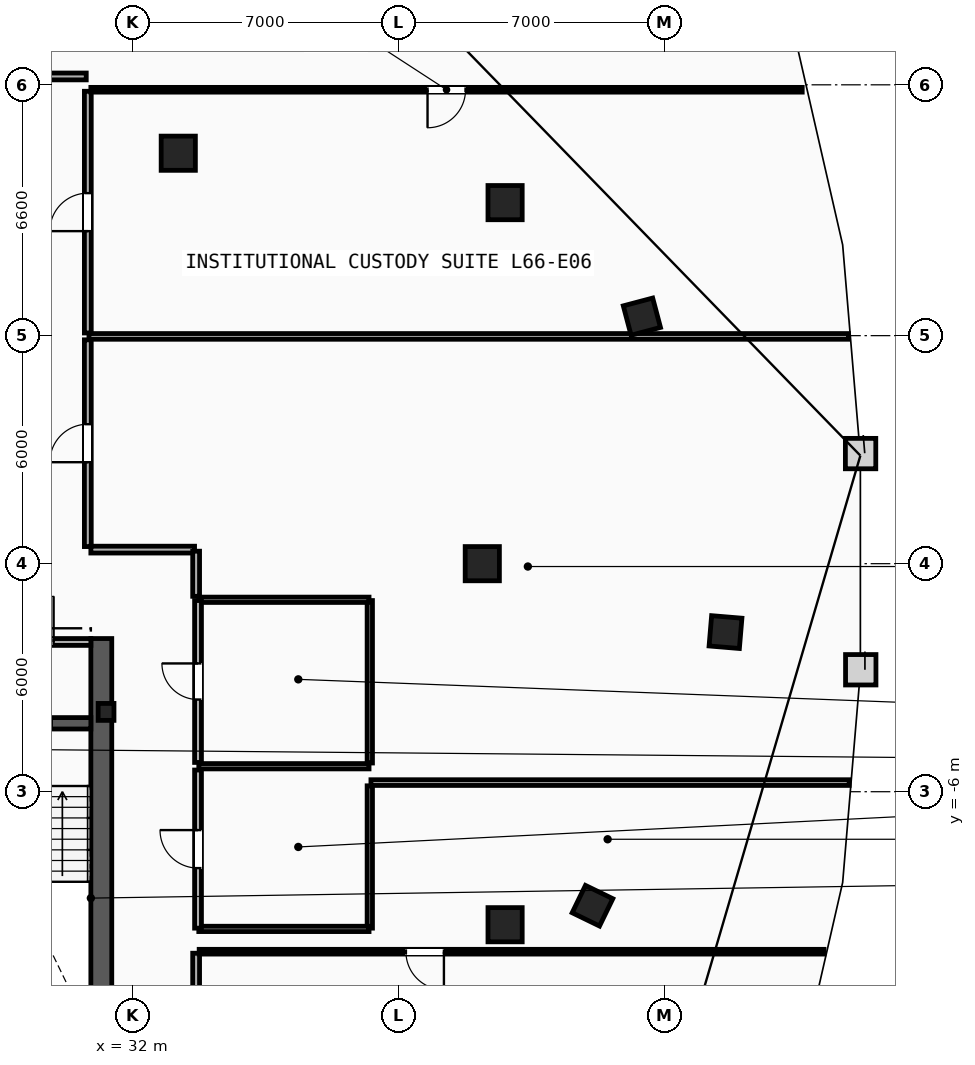
"""IFC4 building model, lengths in metres.
Left out: names, types, materials, properties, quantities, classifications, styles, units other than length and angle.
Written with IfcOpenShell. Run it as: python <this file> out.ifc"""

import sys

from ifc_helpers import new_model, si_unit, direction, frame, frame_2d, origin, origin_2d, place, context, subcontext, project, spatial, rectangle, i_section, extrude, element, fill, save


model = new_model("IFC4")
c1 = context("Model", 3, precision=1e-05, world=origin(), true_north=direction((0.0, 1.0)))
c2 = subcontext(c1, "Body", "Model", "MODEL_VIEW")
j1 = project(units=[si_unit("LENGTHUNIT", "METRE"), si_unit("PLANEANGLEUNIT", "RADIAN")], contexts=[c1])
p1 = place(None, origin())
s1 = spatial("IfcSite", under=j1, at=p1, CompositionType="ELEMENT")
p2 = place(p1, origin())
s2 = spatial("IfcBuilding", under=s1, at=p2, CompositionType="ELEMENT")
p3 = place(p2, frame((0.0, 0.0, 250.4)))
s3 = spatial("IfcBuildingStorey", under=s2, at=p3, CompositionType="ELEMENT", Elevation=250.4)
p4 = place(p3, frame((31.3, -3.9, 0.0), z_axis=(0.0, 0.0, 1.0), x_axis=(1.0, 0.0, 0.0)))
e1 = element("IfcColumn", 1, at=p4, inside=s3, PredefinedType="COLUMN", context=c2, shape_type="SweptSolid", body=[
    extrude(i_section(OverallWidth=0.416, OverallDepth=0.446, WebThickness=0.039, FlangeThickness=0.063, FilletRadius=0.018, at=origin_2d()), origin(), (0.0, 0.0, 1.0), 3.6),
])
for number, where, z_axis, x_axis in (
    (2, (41.2, 0.0, 0.0), (0.0, 0.0, 1.0), (1.0, 0.0, 0.0)),
    (3, (41.8, -9.5, 0.0), (0.0, 0.0, 1.0), (1.0, 0.0, 0.0)),
    (4, (41.8, 9.5, 0.0), (0.0, 0.0, 1.0), (1.0, 0.0, 0.0)),
    (5, (33.2, 10.8, 0.0), (0.0, 0.0, 1.0), (1.0, 0.0, 0.0)),
):
    element("IfcColumn", number, at=place(p3, frame(where, z_axis=z_axis, x_axis=x_axis)), inside=s3, PredefinedType="COLUMN", context=c2, shape_type="SweptSolid", body=[
        extrude(rectangle(XDim=0.9, YDim=0.9, at=origin_2d()), origin(), (0.0, 0.0, 1.0), 3.6),
    ])
for number, where, z_axis, x_axis in (
    (6, (44.1, -9.0, 0.0), (0.0, 0.0, 1.0), (0.437, 0.899, 0.0)),
    (7, (47.6, -1.8, 0.0), (0.0, 0.0, 1.0), (0.084, 0.997, 0.0)),
    (8, (45.4, 6.5, 0.0), (0.0, 0.0, 1.0), (-0.256, 0.967, 0.0)),
):
    element("IfcColumn", number, at=place(p3, frame(where, z_axis=z_axis, x_axis=x_axis)), inside=s3, PredefinedType="COLUMN", context=c2, shape_type="SweptSolid", body=[
        extrude(rectangle(XDim=0.8, YDim=0.8, at=origin_2d()), origin(), (0.0, 0.0, 1.0), 3.6),
    ])
p5 = place(p3, frame((31.175, -15.3, 0.0), z_axis=(0.0, 0.0, 1.0), x_axis=(0.0, 1.0, 0.0)))
e9 = element("IfcWall", 9, at=p5, inside=s3, PredefinedType="SHEAR", context=c2, shape_type="SweptSolid", body=[
    extrude(rectangle(XDim=13.33, YDim=0.55, at=frame_2d((6.665, 0.0))), origin(), (0.0, 0.0, 1.0), 3.34),
])
p6 = place(p3, frame((27.74, -4.2, 0.0), z_axis=(0.0, 0.0, 1.0), x_axis=(1.0, 0.0, 0.0)))
e10 = element("IfcWall", 10, at=p6, inside=s3, PredefinedType="SHEAR", context=c2, shape_type="SweptSolid", body=[
    extrude(rectangle(XDim=3.16, YDim=0.3, at=frame_2d((1.58, 0.0))), origin(), (0.0, 0.0, 1.0), 3.34),
])
p7 = place(p6, frame((1.03, 0.0, 0.0)))
e11 = element("IfcOpeningElement", 11, at=p7, cuts=e10, PredefinedType="OPENING", context=c2, shape_type="SweptSolid", body=[
    extrude(rectangle(XDim=1.1, YDim=2.15, at=frame_2d((0.55, 1.075))), frame((0.0, 0.16, 0.0), z_axis=(0.0, -1.0, 0.0), x_axis=(1.0, 0.0, 0.0)), (0.0, 0.0, 1.0), 0.32),
])
p8 = place(p3, frame((27.74, -2.06, 0.0), z_axis=(0.0, 0.0, 1.0), x_axis=(1.0, 0.0, 0.0)))
e12 = element("IfcWall", 12, at=p8, inside=s3, PredefinedType="PARTITIONING", context=c2, shape_type="SweptSolid", body=[
    extrude(rectangle(XDim=3.16, YDim=0.18, at=frame_2d((1.58, 0.0))), origin(), (0.0, 0.0, 1.0), 3.34),
])
p9 = place(p8, frame((0.98, 0.0, 0.0)))
e13 = element("IfcOpeningElement", 13, at=p9, cuts=e12, PredefinedType="OPENING", context=c2, shape_type="SweptSolid", body=[
    extrude(rectangle(XDim=1.2, YDim=2.15, at=frame_2d((0.6, 1.075))), frame((0.0, 0.1, 0.0), z_axis=(0.0, -1.0, 0.0), x_axis=(1.0, 0.0, 0.0)), (0.0, 0.0, 1.0), 0.2),
])
p10 = place(p3, frame((38.24, -9.59, 0.0), z_axis=(0.0, 0.0, 1.0), x_axis=(0.0, 1.0, 0.0)))
e14 = element("IfcWall", 14, at=p10, inside=s3, PredefinedType="PARTITIONING", context=c2, shape_type="SweptSolid", body=[
    extrude(rectangle(XDim=3.745, YDim=0.14, at=frame_2d((1.873, 0.0))), origin(), (0.0, 0.0, 1.0), 3.34),
])
p11 = place(p3, frame((38.24, -5.245, 0.0), z_axis=(0.0, 0.0, 1.0), x_axis=(0.0, 1.0, 0.0)))
e15 = element("IfcWall", 15, at=p11, inside=s3, PredefinedType="PARTITIONING", context=c2, shape_type="SweptSolid", body=[
    extrude(rectangle(XDim=4.275, YDim=0.14, at=frame_2d((2.138, 0.0))), origin(), (0.0, 0.0, 1.0), 3.34),
])
for number, where, z_axis, x_axis in (
    (16, (33.74, -0.95, 0.0), (0.0, 0.0, 1.0), (1.0, 0.0, 0.0)),
    (17, (33.74, -5.33, 0.0), (0.0, 0.0, 1.0), (1.0, 0.0, 0.0)),
    (18, (33.74, -9.61, 0.0), (0.0, 0.0, 1.0), (1.0, 0.0, 0.0)),
):
    element("IfcWall", number, at=place(p3, frame(where, z_axis=z_axis, x_axis=x_axis)), inside=s3, PredefinedType="PARTITIONING", context=c2, shape_type="SweptSolid", body=[
        extrude(rectangle(XDim=4.48, YDim=0.14, at=frame_2d((2.24, 0.0))), origin(), (0.0, 0.0, 1.0), 3.34),
    ])
p12 = place(p3, frame((33.72, -5.23, 0.0), z_axis=(0.0, 0.0, 1.0), x_axis=(0.0, 1.0, 0.0)))
e19 = element("IfcWall", 19, at=p12, inside=s3, PredefinedType="PARTITIONING", context=c2, shape_type="SweptSolid", body=[
    extrude(rectangle(XDim=4.26, YDim=0.18, at=frame_2d((2.13, 0.0))), origin(), (0.0, 0.0, 1.0), 3.34),
])
p13 = place(p12, frame((1.655, 0.0, 0.0)))
e20 = element("IfcOpeningElement", 20, at=p13, cuts=e19, PredefinedType="OPENING", context=c2, shape_type="SweptSolid", body=[
    extrude(rectangle(XDim=0.95, YDim=2.1, at=frame_2d((0.475, 1.05))), frame((0.0, 0.1, 0.0), z_axis=(0.0, -1.0, 0.0), x_axis=(1.0, 0.0, 0.0)), (0.0, 0.0, 1.0), 0.2),
])
p14 = place(p3, frame((33.72, -9.59, 0.0), z_axis=(0.0, 0.0, 1.0), x_axis=(0.0, 1.0, 0.0)))
e21 = element("IfcWall", 21, at=p14, inside=s3, PredefinedType="PARTITIONING", context=c2, shape_type="SweptSolid", body=[
    extrude(rectangle(XDim=4.16, YDim=0.18, at=frame_2d((2.08, 0.0))), origin(), (0.0, 0.0, 1.0), 3.34),
])
p15 = place(p14, frame((1.58, 0.0, 0.0)))
e22 = element("IfcOpeningElement", 22, at=p15, cuts=e21, PredefinedType="OPENING", context=c2, shape_type="SweptSolid", body=[
    extrude(rectangle(XDim=1.0, YDim=2.15, at=frame_2d((0.5, 1.075))), frame((0.0, 0.1, 0.0), z_axis=(0.0, -1.0, 0.0), x_axis=(1.0, 0.0, 0.0)), (0.0, 0.0, 1.0), 0.2),
])
p16 = place(p3, frame((30.85, 5.98, 0.0), z_axis=(0.0, 0.0, 1.0), x_axis=(1.0, 0.0, 0.0)))
e23 = element("IfcWall", 23, at=p16, inside=s3, PredefinedType="PARTITIONING", context=c2, shape_type="SweptSolid", body=[
    extrude(rectangle(XDim=19.985, YDim=0.15, at=frame_2d((9.993, 0.0))), origin(), (0.0, 0.0, 1.0), 3.34),
])
p17 = place(p3, frame((38.27, -5.76, 0.0), z_axis=(0.0, 0.0, 1.0), x_axis=(1.0, 0.0, 0.0)))
e24 = element("IfcWall", 24, at=p17, inside=s3, PredefinedType="PARTITIONING", context=c2, shape_type="SweptSolid", body=[
    extrude(rectangle(XDim=12.584, YDim=0.15, at=frame_2d((6.292, 0.0))), origin(), (0.0, 0.0, 1.0), 3.34),
])
p18 = place(p3, frame((33.67, -17.428, 0.0), z_axis=(0.0, 0.0, 1.0), x_axis=(0.0, 1.0, 0.0)))
e25 = element("IfcWall", 25, at=p18, inside=s3, PredefinedType="PARTITIONING", context=c2, shape_type="SweptSolid", body=[
    extrude(rectangle(XDim=7.178, YDim=0.18, at=frame_2d((3.589, 0.0))), origin(), (0.0, 0.0, 1.0), 3.34),
])
p19 = place(p3, frame((30.82, 0.45, 0.0), z_axis=(0.0, 0.0, 1.0), x_axis=(0.0, 1.0, 0.0)))
e26 = element("IfcWall", 26, at=p19, inside=s3, PredefinedType="PARTITIONING", context=c2, shape_type="SweptSolid", body=[
    extrude(rectangle(XDim=5.44, YDim=0.18, at=frame_2d((2.72, 0.0))), origin(), (0.0, 0.0, 1.0), 3.34),
])
p20 = place(p19, frame((2.22, 0.0, 0.0)))
e27 = element("IfcOpeningElement", 27, at=p20, cuts=e26, PredefinedType="OPENING", context=c2, shape_type="SweptSolid", body=[
    extrude(rectangle(XDim=1.0, YDim=2.15, at=frame_2d((0.5, 1.075))), frame((0.0, 0.1, 0.0), z_axis=(0.0, -1.0, 0.0), x_axis=(1.0, 0.0, 0.0)), (0.0, 0.0, 1.0), 0.2),
])
p21 = place(p3, frame((33.628, 0.37, 0.0), z_axis=(0.0, 0.0, 1.0), x_axis=(-1.0, 0.0, 0.0)))
e28 = element("IfcWall", 28, at=p21, inside=s3, PredefinedType="PARTITIONING", context=c2, shape_type="SweptSolid", body=[
    extrude(rectangle(XDim=2.729, YDim=0.18, at=frame_2d((1.364, 0.0))), origin(), (0.0, 0.0, 1.0), 3.34),
])
p22 = place(p3, frame((33.67, -0.859, 0.0), z_axis=(0.0, 0.0, 1.0), x_axis=(0.0, 1.0, 0.0)))
e29 = element("IfcWall", 29, at=p22, inside=s3, PredefinedType="PARTITIONING", context=c2, shape_type="SweptSolid", body=[
    extrude(rectangle(XDim=1.187, YDim=0.18, at=frame_2d((0.594, 0.0))), origin(), (0.0, 0.0, 1.0), 3.34),
])
p23 = place(p3, frame((30.82, 6.07, 0.0), z_axis=(0.0, 0.0, 1.0), x_axis=(0.0, 1.0, 0.0)))
e30 = element("IfcWall", 30, at=p23, inside=s3, PredefinedType="PARTITIONING", context=c2, shape_type="SweptSolid", body=[
    extrude(rectangle(XDim=6.36, YDim=0.18, at=frame_2d((3.18, 0.0))), origin(), (0.0, 0.0, 1.0), 3.34),
])
p24 = place(p23, frame((2.68, 0.0, 0.0)))
e31 = element("IfcOpeningElement", 31, at=p24, cuts=e30, PredefinedType="OPENING", context=c2, shape_type="SweptSolid", body=[
    extrude(rectangle(XDim=1.0, YDim=2.15, at=frame_2d((0.5, 1.075))), frame((0.0, 0.1, 0.0), z_axis=(0.0, -1.0, 0.0), x_axis=(1.0, 0.0, 0.0)), (0.0, 0.0, 1.0), 0.2),
])
p25 = place(p3, frame((30.779, 12.82, 0.0), z_axis=(0.0, 0.0, 1.0), x_axis=(-1.0, 0.0, 0.0)))
e32 = element("IfcWall", 32, at=p25, inside=s3, PredefinedType="PARTITIONING", context=c2, shape_type="SweptSolid", body=[
    extrude(rectangle(XDim=2.357, YDim=0.18, at=frame_2d((1.179, 0.0))), origin(), (0.0, 0.0, 1.0), 3.34),
])
p26 = place(p3, frame((50.191, -10.21, 0.0), z_axis=(0.0, 0.0, 1.0), x_axis=(-1.0, 0.0, 0.0)))
e33 = element("IfcWall", 33, at=p26, inside=s3, PredefinedType="PARTITIONING", context=c2, shape_type="SweptSolid", body=[
    extrude(rectangle(XDim=16.441, YDim=0.125, at=frame_2d((8.221, 0.0))), origin(), (0.0, 0.0, 1.0), 3.34),
])
p27 = place(p26, frame((10.001, 0.0, 0.0)))
e34 = element("IfcOpeningElement", 34, at=p27, cuts=e33, PredefinedType="OPENING", context=c2, shape_type="SweptSolid", body=[
    extrude(rectangle(XDim=1.0, YDim=2.15, at=frame_2d((0.5, 1.075))), frame((0.0, 0.073, 0.0), z_axis=(0.0, -1.0, 0.0), x_axis=(1.0, 0.0, 0.0)), (0.0, 0.0, 1.0), 0.145),
])
p28 = place(p3, frame((49.619, 12.47, 0.0), z_axis=(0.0, 0.0, 1.0), x_axis=(-1.0, 0.0, 0.0)))
e35 = element("IfcWall", 35, at=p28, inside=s3, PredefinedType="PARTITIONING", context=c2, shape_type="SweptSolid", body=[
    extrude(rectangle(XDim=18.719, YDim=0.125, at=frame_2d((9.359, 0.0))), origin(), (0.0, 0.0, 1.0), 3.34),
])
p29 = place(p28, frame((8.859, 0.0, 0.0)))
e36 = element("IfcOpeningElement", 36, at=p29, cuts=e35, PredefinedType="OPENING", context=c2, shape_type="SweptSolid", body=[
    extrude(rectangle(XDim=1.0, YDim=2.15, at=frame_2d((0.5, 1.075))), frame((0.0, 0.073, 0.0), z_axis=(0.0, -1.0, 0.0), x_axis=(1.0, 0.0, 0.0)), (0.0, 0.0, 1.0), 0.145),
])
p30 = place(p9, origin())
e37 = element("IfcDoor", 37, at=p30, inside=s3, OperationType="SINGLE_SWING_RIGHT", PredefinedType="DOOR", context=c2, shape_type="SweptSolid", body=[
    extrude(rectangle(XDim=1.2, YDim=2.15, at=frame_2d((0.6, 1.075))), frame((0.0, 0.025, 0.0), z_axis=(0.0, -1.0, 0.0), x_axis=(1.0, 0.0, 0.0)), (0.0, 0.0, 1.0), 0.05),
])
fill(e13, e37)
p31 = place(p29, origin())
e38 = element("IfcDoor", 38, at=p31, inside=s3, OperationType="SINGLE_SWING_RIGHT", PredefinedType="DOOR", context=c2, shape_type="SweptSolid", body=[
    extrude(rectangle(XDim=1.0, YDim=2.15, at=frame_2d((0.5, 1.075))), frame((0.0, 0.025, 0.0), z_axis=(0.0, -1.0, 0.0), x_axis=(1.0, 0.0, 0.0)), (0.0, 0.0, 1.0), 0.05),
])
fill(e36, e38)
p32 = place(p27, origin())
e39 = element("IfcDoor", 39, at=p32, inside=s3, OperationType="SINGLE_SWING_LEFT", PredefinedType="DOOR", context=c2, shape_type="SweptSolid", body=[
    extrude(rectangle(XDim=1.0, YDim=2.15, at=frame_2d((0.5, 1.075))), frame((0.0, 0.025, 0.0), z_axis=(0.0, -1.0, 0.0), x_axis=(1.0, 0.0, 0.0)), (0.0, 0.0, 1.0), 0.05),
])
fill(e34, e39)
p33 = place(p24, origin())
e40 = element("IfcDoor", 40, at=p33, inside=s3, OperationType="SINGLE_SWING_LEFT", PredefinedType="DOOR", context=c2, shape_type="SweptSolid", body=[
    extrude(rectangle(XDim=1.0, YDim=2.15, at=frame_2d((0.5, 1.075))), frame((0.0, 0.025, 0.0), z_axis=(0.0, -1.0, 0.0), x_axis=(1.0, 0.0, 0.0)), (0.0, 0.0, 1.0), 0.05),
])
fill(e31, e40)
p34 = place(p20, origin())
e41 = element("IfcDoor", 41, at=p34, inside=s3, OperationType="SINGLE_SWING_LEFT", PredefinedType="DOOR", context=c2, shape_type="SweptSolid", body=[
    extrude(rectangle(XDim=1.0, YDim=2.15, at=frame_2d((0.5, 1.075))), frame((0.0, 0.025, 0.0), z_axis=(0.0, -1.0, 0.0), x_axis=(1.0, 0.0, 0.0)), (0.0, 0.0, 1.0), 0.05),
])
fill(e27, e41)
p35 = place(p13, origin())
e42 = element("IfcDoor", 42, at=p35, inside=s3, OperationType="SINGLE_SWING_RIGHT", PredefinedType="DOOR", context=c2, shape_type="SweptSolid", body=[
    extrude(rectangle(XDim=0.95, YDim=2.1, at=frame_2d((0.475, 1.05))), frame((0.0, 0.025, 0.0), z_axis=(0.0, -1.0, 0.0), x_axis=(1.0, 0.0, 0.0)), (0.0, 0.0, 1.0), 0.05),
])
fill(e20, e42)
p36 = place(p15, origin())
e43 = element("IfcDoor", 43, at=p36, inside=s3, OperationType="SINGLE_SWING_RIGHT", PredefinedType="DOOR", context=c2, shape_type="SweptSolid", body=[
    extrude(rectangle(XDim=1.0, YDim=2.15, at=frame_2d((0.5, 1.075))), frame((0.0, 0.025, 0.0), z_axis=(0.0, -1.0, 0.0), x_axis=(1.0, 0.0, 0.0)), (0.0, 0.0, 1.0), 0.05),
])
fill(e22, e43)
save(model, sys.argv[1])
